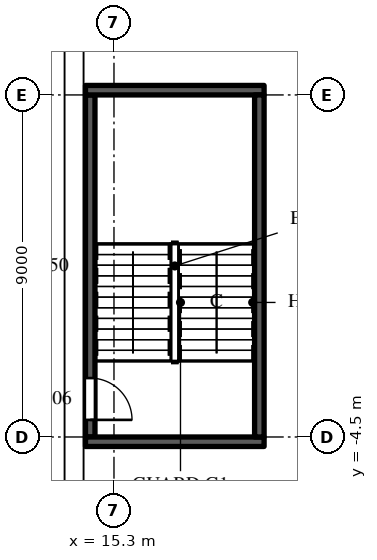
"""IFC4 building model, lengths in metres.
Left out: names, types, materials, properties, quantities, classifications, styles, units other than length and angle.
Written with IfcOpenShell. Run it as: python <this file> out.ifc"""

import sys

from ifc_helpers import new_model, si_unit, direction, frame, frame_2d, origin, place, context, subcontext, project, spatial, rectangle, extrude, element, fill, save


model = new_model("IFC4")
c1 = context("Model", 3, precision=1e-05, world=origin(), true_north=direction((0.0, 1.0)))
c2 = subcontext(c1, "Body", "Model", "MODEL_VIEW")
j1 = project(units=[si_unit("LENGTHUNIT", "METRE"), si_unit("PLANEANGLEUNIT", "RADIAN")], contexts=[c1])
p1 = place(None, origin())
s1 = spatial("IfcSite", under=j1, at=p1, CompositionType="ELEMENT")
p2 = place(p1, origin())
s2 = spatial("IfcBuilding", under=s1, at=p2, CompositionType="ELEMENT")
p3 = place(p2, frame((0.0, 0.0, 36.0)))
s3 = spatial("IfcBuildingStorey", under=s2, at=p3, CompositionType="ELEMENT", Elevation=36.0)
p4 = place(p3, frame((14.675, -4.5, 0.0), z_axis=(0.0, 0.0, 1.0), x_axis=(0.0, 1.0, 0.0)))
e1 = element("IfcWall", 1, at=p4, inside=s3, PredefinedType="SHEAR", context=c2, shape_type="SweptSolid", body=[
    extrude(rectangle(XDim=9.0, YDim=0.25, at=frame_2d((4.5, 0.0))), origin(), (0.0, 0.0, 1.0), 7.6),
])
p5 = place(p4, frame((0.45, 0.0, 0.0)))
e2 = element("IfcOpeningElement", 2, at=p5, cuts=e1, PredefinedType="OPENING", context=c2, shape_type="SweptSolid", body=[
    extrude(rectangle(XDim=1.1, YDim=2.2, at=frame_2d((0.55, 1.1))), frame((0.0, 0.135, 0.0), z_axis=(0.0, -1.0, 0.0), x_axis=(1.0, 0.0, 0.0)), (0.0, 0.0, 1.0), 0.27),
])
for number, where, z_axis, x_axis in (
    (3, (14.55, -4.625, 0.0), (0.0, 0.0, 1.0), (1.0, 0.0, 0.0)),
    (4, (14.55, 4.625, 0.0), (0.0, 0.0, 1.0), (1.0, 0.0, 0.0)),
):
    element("IfcWall", number, at=place(p3, frame(where, z_axis=z_axis, x_axis=x_axis)), inside=s3, PredefinedType="SHEAR", context=c2, shape_type="SweptSolid", body=[
        extrude(rectangle(XDim=4.7, YDim=0.25, at=frame_2d((2.35, 0.0))), origin(), (0.0, 0.0, 1.0), 7.6),
    ])
p6 = place(p3, frame((19.125, -4.5, 0.0), z_axis=(0.0, 0.0, 1.0), x_axis=(0.0, 1.0, 0.0)))
e5 = element("IfcWall", 5, at=p6, inside=s3, PredefinedType="SHEAR", context=c2, shape_type="SweptSolid", body=[
    extrude(rectangle(XDim=9.0, YDim=0.25, at=frame_2d((4.5, 0.0))), origin(), (0.0, 0.0, 1.0), 7.6),
])
p7 = place(p5, origin())
e6 = element("IfcDoor", 6, at=p7, inside=s3, OperationType="SINGLE_SWING_RIGHT", PredefinedType="DOOR", context=c2, shape_type="SweptSolid", body=[
    extrude(rectangle(XDim=1.1, YDim=2.2, at=frame_2d((0.55, 1.1))), frame((0.0, 0.025, 0.0), z_axis=(0.0, -1.0, 0.0), x_axis=(1.0, 0.0, 0.0)), (0.0, 0.0, 1.0), 0.05),
])
fill(e2, e6)
save(model, sys.argv[1])
